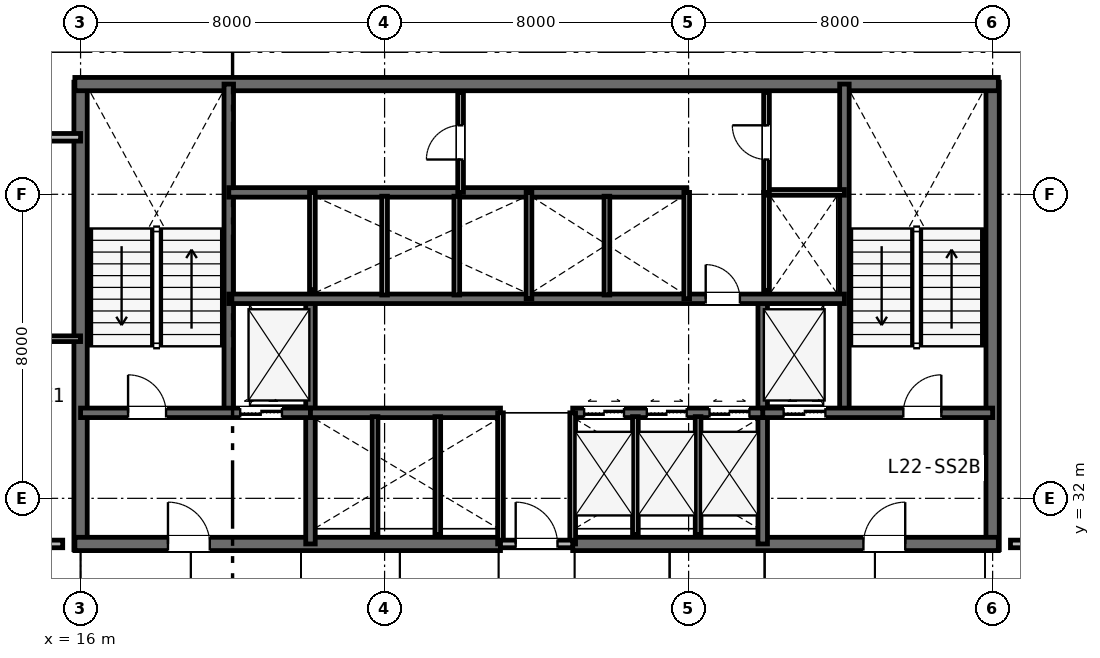
"""IFC4 building model, lengths in metres.
Left out: names, types, materials, properties, quantities, classifications, styles, units other than length and angle.
Written with IfcOpenShell. Run it as: python <this file> out.ifc"""

import sys

from ifc_helpers import new_model, si_unit, direction, frame, frame_2d, origin, place, context, subcontext, project, spatial, rectangle, extrude, element, fill, save


model = new_model("IFC4")
c1 = context("Model", 3, precision=1e-05, world=origin(), true_north=direction((0.0, 1.0)))
c2 = subcontext(c1, "Body", "Model", "MODEL_VIEW")
j1 = project(units=[si_unit("LENGTHUNIT", "METRE"), si_unit("PLANEANGLEUNIT", "RADIAN")], contexts=[c1])
p1 = place(None, origin())
s1 = spatial("IfcSite", under=j1, at=p1, CompositionType="ELEMENT")
p2 = place(p1, origin())
s2 = spatial("IfcBuilding", under=s1, at=p2, CompositionType="ELEMENT")
p3 = place(p2, frame((0.0, 0.0, 90.0)))
s3 = spatial("IfcBuildingStorey", under=s2, at=p3, CompositionType="ELEMENT", Elevation=90.0)
for number, where, z_axis, x_axis in (
    (1, (16.0, 30.65, 0.0), (0.0, 0.0, 1.0), (0.0, 1.0, 0.0)),
    (2, (40.0, 30.65, 0.0), (0.0, 0.0, 1.0), (0.0, 1.0, 0.0)),
):
    element("IfcWall", number, at=place(p3, frame(where, z_axis=z_axis, x_axis=x_axis)), inside=s3, PredefinedType="SHEAR", context=c2, shape_type="SweptSolid", body=[
        extrude(rectangle(XDim=12.3, YDim=0.35, at=frame_2d((6.15, 0.0))), origin(), (0.0, 0.0, 1.0), 3.6),
    ])
p4 = place(p3, frame((15.85, 42.9, 0.0), z_axis=(0.0, 0.0, 1.0), x_axis=(1.0, 0.0, 0.0)))
e3 = element("IfcWall", 3, at=p4, inside=s3, PredefinedType="SHEAR", context=c2, shape_type="SweptSolid", body=[
    extrude(rectangle(XDim=24.3, YDim=0.35, at=frame_2d((12.15, 0.0))), origin(), (0.0, 0.0, 1.0), 3.6),
])
p5 = place(p3, frame((15.85, 30.8, 0.0), z_axis=(0.0, 0.0, 1.0), x_axis=(1.0, 0.0, 0.0)))
e4 = element("IfcWall", 4, at=p5, inside=s3, PredefinedType="SHEAR", context=c2, shape_type="SweptSolid", body=[
    extrude(rectangle(XDim=11.2, YDim=0.35, at=frame_2d((5.6, 0.0))), origin(), (0.0, 0.0, 1.0), 3.6),
])
p6 = place(p5, frame((2.45, 0.0, 0.0)))
e5 = element("IfcOpeningElement", 5, at=p6, cuts=e4, PredefinedType="OPENING", context=c2, shape_type="SweptSolid", body=[
    extrude(rectangle(XDim=1.1, YDim=2.15, at=frame_2d((0.55, 1.075))), frame((0.0, 0.185, 0.0), z_axis=(0.0, -1.0, 0.0), x_axis=(1.0, 0.0, 0.0)), (0.0, 0.0, 1.0), 0.37),
])
p7 = place(p3, frame((28.95, 30.8, 0.0), z_axis=(0.0, 0.0, 1.0), x_axis=(1.0, 0.0, 0.0)))
e6 = element("IfcWall", 6, at=p7, inside=s3, PredefinedType="SHEAR", context=c2, shape_type="SweptSolid", body=[
    extrude(rectangle(XDim=11.2, YDim=0.35, at=frame_2d((5.6, 0.0))), origin(), (0.0, 0.0, 1.0), 3.6),
])
p8 = place(p7, frame((7.65, 0.0, 0.0)))
e7 = element("IfcOpeningElement", 7, at=p8, cuts=e6, PredefinedType="OPENING", context=c2, shape_type="SweptSolid", body=[
    extrude(rectangle(XDim=1.1, YDim=2.15, at=frame_2d((0.55, 1.075))), frame((0.0, 0.185, 0.0), z_axis=(0.0, -1.0, 0.0), x_axis=(1.0, 0.0, 0.0)), (0.0, 0.0, 1.0), 0.37),
])
for number, where, z_axis, x_axis in (
    (8, (19.9, 34.25, 0.0), (0.0, 0.0, 1.0), (0.0, 1.0, 0.0)),
    (9, (36.1, 34.25, 0.0), (0.0, 0.0, 1.0), (0.0, 1.0, 0.0)),
):
    element("IfcWall", number, at=place(p3, frame(where, z_axis=z_axis, x_axis=x_axis)), inside=s3, PredefinedType="SHEAR", context=c2, shape_type="SweptSolid", body=[
        extrude(rectangle(XDim=8.65, YDim=0.25, at=frame_2d((4.325, 0.0))), origin(), (0.0, 0.0, 1.0), 3.6),
    ])
for number, where, z_axis, x_axis in (
    (10, (22.05, 30.8, 0.0), (0.0, 0.0, 1.0), (0.0, 1.0, 0.0)),
    (11, (33.95, 30.8, 0.0), (0.0, 0.0, 1.0), (0.0, 1.0, 0.0)),
):
    element("IfcWall", number, at=place(p3, frame(where, z_axis=z_axis, x_axis=x_axis)), inside=s3, PredefinedType="SHEAR", context=c2, shape_type="SweptSolid", body=[
        extrude(rectangle(XDim=6.45, YDim=0.25, at=frame_2d((3.225, 0.0))), origin(), (0.0, 0.0, 1.0), 3.6),
    ])
p9 = place(p3, frame((16.0, 34.25, 0.0), z_axis=(0.0, 0.0, 1.0), x_axis=(1.0, 0.0, 0.0)))
e12 = element("IfcWall", 12, at=p9, inside=s3, PredefinedType="SHEAR", context=c2, shape_type="SweptSolid", body=[
    extrude(rectangle(XDim=6.05, YDim=0.25, at=frame_2d((3.025, 0.0))), origin(), (0.0, 0.0, 1.0), 3.6),
])
p10 = place(p9, frame((1.25, 0.0, 0.0)))
e13 = element("IfcOpeningElement", 13, at=p10, cuts=e12, PredefinedType="OPENING", context=c2, shape_type="SweptSolid", body=[
    extrude(rectangle(XDim=1.0, YDim=2.15, at=frame_2d((0.5, 1.075))), frame((0.0, 0.135, 0.0), z_axis=(0.0, -1.0, 0.0), x_axis=(1.0, 0.0, 0.0)), (0.0, 0.0, 1.0), 0.27),
])
p11 = place(p9, frame((4.2, 0.0, 0.0)))
e14 = element("IfcOpeningElement", 14, at=p11, cuts=e12, PredefinedType="OPENING", context=c2, shape_type="SweptSolid", body=[
    extrude(rectangle(XDim=1.1, YDim=2.15, at=frame_2d((0.55, 1.075))), frame((0.0, 0.135, 0.0), z_axis=(0.0, -1.0, 0.0), x_axis=(1.0, 0.0, 0.0)), (0.0, 0.0, 1.0), 0.27),
])
p12 = place(p3, frame((33.95, 34.25, 0.0), z_axis=(0.0, 0.0, 1.0), x_axis=(1.0, 0.0, 0.0)))
e15 = element("IfcWall", 15, at=p12, inside=s3, PredefinedType="SHEAR", context=c2, shape_type="SweptSolid", body=[
    extrude(rectangle(XDim=6.05, YDim=0.25, at=frame_2d((3.025, 0.0))), origin(), (0.0, 0.0, 1.0), 3.6),
])
p13 = place(p12, frame((3.7, 0.0, 0.0)))
e16 = element("IfcOpeningElement", 16, at=p13, cuts=e15, PredefinedType="OPENING", context=c2, shape_type="SweptSolid", body=[
    extrude(rectangle(XDim=1.0, YDim=2.15, at=frame_2d((0.5, 1.075))), frame((0.0, 0.135, 0.0), z_axis=(0.0, -1.0, 0.0), x_axis=(1.0, 0.0, 0.0)), (0.0, 0.0, 1.0), 0.27),
])
p14 = place(p12, frame((0.55, 0.0, 0.0)))
e17 = element("IfcOpeningElement", 17, at=p14, cuts=e15, PredefinedType="OPENING", context=c2, shape_type="SweptSolid", body=[
    extrude(rectangle(XDim=1.1, YDim=2.15, at=frame_2d((0.55, 1.075))), frame((0.0, 0.135, 0.0), z_axis=(0.0, -1.0, 0.0), x_axis=(1.0, 0.0, 0.0)), (0.0, 0.0, 1.0), 0.27),
])
p15 = place(p3, frame((22.05, 34.25, 0.0), z_axis=(0.0, 0.0, 1.0), x_axis=(1.0, 0.0, 0.0)))
e18 = element("IfcWall", 18, at=p15, inside=s3, PredefinedType="SHEAR", context=c2, shape_type="SweptSolid", body=[
    extrude(rectangle(XDim=5.0, YDim=0.25, at=frame_2d((2.5, 0.0))), origin(), (0.0, 0.0, 1.0), 3.6),
])
p16 = place(p3, frame((28.95, 34.25, 0.0), z_axis=(0.0, 0.0, 1.0), x_axis=(1.0, 0.0, 0.0)))
e19 = element("IfcWall", 19, at=p16, inside=s3, PredefinedType="SHEAR", context=c2, shape_type="SweptSolid", body=[
    extrude(rectangle(XDim=5.0, YDim=0.25, at=frame_2d((2.5, 0.0))), origin(), (0.0, 0.0, 1.0), 3.6),
])
p17 = place(p16, frame((0.3, 0.0, 0.0)))
e20 = element("IfcOpeningElement", 20, at=p17, cuts=e19, PredefinedType="OPENING", context=c2, shape_type="SweptSolid", body=[
    extrude(rectangle(XDim=1.05, YDim=2.15, at=frame_2d((0.525, 1.075))), frame((0.0, 0.135, 0.0), z_axis=(0.0, -1.0, 0.0), x_axis=(1.0, 0.0, 0.0)), (0.0, 0.0, 1.0), 0.27),
])
p18 = place(p16, frame((1.95, 0.0, 0.0)))
e21 = element("IfcOpeningElement", 21, at=p18, cuts=e19, PredefinedType="OPENING", context=c2, shape_type="SweptSolid", body=[
    extrude(rectangle(XDim=1.05, YDim=2.15, at=frame_2d((0.525, 1.075))), frame((0.0, 0.135, 0.0), z_axis=(0.0, -1.0, 0.0), x_axis=(1.0, 0.0, 0.0)), (0.0, 0.0, 1.0), 0.27),
])
p19 = place(p16, frame((3.6, 0.0, 0.0)))
e22 = element("IfcOpeningElement", 22, at=p19, cuts=e19, PredefinedType="OPENING", context=c2, shape_type="SweptSolid", body=[
    extrude(rectangle(XDim=1.05, YDim=2.15, at=frame_2d((0.525, 1.075))), frame((0.0, 0.135, 0.0), z_axis=(0.0, -1.0, 0.0), x_axis=(1.0, 0.0, 0.0)), (0.0, 0.0, 1.0), 0.27),
])
p20 = place(p3, frame((19.9, 37.25, 0.0), z_axis=(0.0, 0.0, 1.0), x_axis=(1.0, 0.0, 0.0)))
e23 = element("IfcWall", 23, at=p20, inside=s3, PredefinedType="SHEAR", context=c2, shape_type="SweptSolid", body=[
    extrude(rectangle(XDim=16.2, YDim=0.25, at=frame_2d((8.1, 0.0))), origin(), (0.0, 0.0, 1.0), 3.6),
])
p21 = place(p20, frame((12.55, 0.0, 0.0)))
e24 = element("IfcOpeningElement", 24, at=p21, cuts=e23, PredefinedType="OPENING", context=c2, shape_type="SweptSolid", body=[
    extrude(rectangle(XDim=0.9, YDim=2.15, at=frame_2d((0.45, 1.075))), frame((0.0, 0.135, 0.0), z_axis=(0.0, -1.0, 0.0), x_axis=(1.0, 0.0, 0.0)), (0.0, 0.0, 1.0), 0.27),
])
p22 = place(p3, frame((19.9, 40.05, 0.0), z_axis=(0.0, 0.0, 1.0), x_axis=(1.0, 0.0, 0.0)))
e25 = element("IfcWall", 25, at=p22, inside=s3, PredefinedType="SHEAR", context=c2, shape_type="SweptSolid", body=[
    extrude(rectangle(XDim=12.05, YDim=0.25, at=frame_2d((6.025, 0.0))), origin(), (0.0, 0.0, 1.0), 3.6),
])
p23 = place(p3, frame((27.05, 30.8, 0.0), z_axis=(0.0, 0.0, 1.0), x_axis=(0.0, 1.0, 0.0)))
e26 = element("IfcWall", 26, at=p23, inside=s3, PredefinedType="PLUMBINGWALL", context=c2, shape_type="SweptSolid", body=[
    extrude(rectangle(XDim=3.45, YDim=0.15, at=frame_2d((1.725, 0.0))), origin(), (0.0, 0.0, 1.0), 3.02),
])
p24 = place(p3, frame((28.95, 30.8, 0.0), z_axis=(0.0, 0.0, 1.0), x_axis=(0.0, 1.0, 0.0)))
e27 = element("IfcWall", 27, at=p24, inside=s3, PredefinedType="PLUMBINGWALL", context=c2, shape_type="SweptSolid", body=[
    extrude(rectangle(XDim=3.45, YDim=0.15, at=frame_2d((1.725, 0.0))), origin(), (0.0, 0.0, 1.0), 3.33),
])
p25 = place(p3, frame((27.05, 30.8, 0.0), z_axis=(0.0, 0.0, 1.0), x_axis=(1.0, 0.0, 0.0)))
e28 = element("IfcWall", 28, at=p25, inside=s3, PredefinedType="PARTITIONING", context=c2, shape_type="SweptSolid", body=[
    extrude(rectangle(XDim=1.9, YDim=0.2, at=frame_2d((0.95, 0.0))), origin(), (0.0, 0.0, 1.0), 3.02),
])
p26 = place(p25, frame((0.4, 0.0, 0.0)))
e29 = element("IfcOpeningElement", 29, at=p26, cuts=e28, PredefinedType="OPENING", context=c2, shape_type="SweptSolid", body=[
    extrude(rectangle(XDim=1.1, YDim=2.15, at=frame_2d((0.55, 1.075))), frame((0.0, 0.11, 0.0), z_axis=(0.0, -1.0, 0.0), x_axis=(1.0, 0.0, 0.0)), (0.0, 0.0, 1.0), 0.22),
])
p27 = place(p3, frame((23.75, 31.05, 0.0), z_axis=(0.0, 0.0, 1.0), x_axis=(0.0, 1.0, 0.0)))
e30 = element("IfcWall", 30, at=p27, inside=s3, PredefinedType="PLUMBINGWALL", context=c2, shape_type="SweptSolid", body=[
    extrude(rectangle(XDim=3.1, YDim=0.15, at=frame_2d((1.55, 0.0))), origin(), (0.0, 0.0, 1.0), 2.83),
])
for number, where, z_axis, x_axis in (
    (31, (25.4, 31.05, 0.0), (0.0, 0.0, 1.0), (0.0, 1.0, 0.0)),
    (32, (30.6, 31.05, 0.0), (0.0, 0.0, 1.0), (0.0, 1.0, 0.0)),
    (33, (32.25, 31.05, 0.0), (0.0, 0.0, 1.0), (0.0, 1.0, 0.0)),
):
    element("IfcWall", number, at=place(p3, frame(where, z_axis=z_axis, x_axis=x_axis)), inside=s3, PredefinedType="PLUMBINGWALL", context=c2, shape_type="SweptSolid", body=[
        extrude(rectangle(XDim=3.1, YDim=0.15, at=frame_2d((1.55, 0.0))), origin(), (0.0, 0.0, 1.0), 3.33),
    ])
p28 = place(p3, frame((22.1, 37.49, 0.0), z_axis=(0.0, 0.0, 1.0), x_axis=(0.0, 1.0, 0.0)))
e34 = element("IfcWall", 34, at=p28, inside=s3, PredefinedType="PLUMBINGWALL", context=c2, shape_type="SweptSolid", body=[
    extrude(rectangle(XDim=2.56, YDim=0.15, at=frame_2d((1.28, 0.0))), origin(), (0.0, 0.0, 1.0), 3.33),
])
p29 = place(p3, frame((27.8, 37.25, 0.0), z_axis=(0.0, 0.0, 1.0), x_axis=(0.0, 1.0, 0.0)))
e35 = element("IfcWall", 35, at=p29, inside=s3, PredefinedType="PLUMBINGWALL", context=c2, shape_type="SweptSolid", body=[
    extrude(rectangle(XDim=2.8, YDim=0.15, at=frame_2d((1.4, 0.0))), origin(), (0.0, 0.0, 1.0), 3.33),
])
for number, where, z_axis, x_axis in (
    (36, (24.0, 37.35, 0.0), (0.0, 0.0, 1.0), (0.0, 1.0, 0.0)),
    (37, (25.9, 37.35, 0.0), (0.0, 0.0, 1.0), (0.0, 1.0, 0.0)),
):
    element("IfcWall", number, at=place(p3, frame(where, z_axis=z_axis, x_axis=x_axis)), inside=s3, PredefinedType="PLUMBINGWALL", context=c2, shape_type="SweptSolid", body=[
        extrude(rectangle(XDim=2.6, YDim=0.15, at=frame_2d((1.3, 0.0))), origin(), (0.0, 0.0, 1.0), 3.33),
    ])
p30 = place(p3, frame((31.95, 37.25, 0.0), z_axis=(0.0, 0.0, 1.0), x_axis=(0.0, 1.0, 0.0)))
e38 = element("IfcWall", 38, at=p30, inside=s3, PredefinedType="PLUMBINGWALL", context=c2, shape_type="SweptSolid", body=[
    extrude(rectangle(XDim=2.8, YDim=0.15, at=frame_2d((1.4, 0.0))), origin(), (0.0, 0.0, 1.0), 3.33),
])
p31 = place(p3, frame((29.85, 37.35, 0.0), z_axis=(0.0, 0.0, 1.0), x_axis=(0.0, 1.0, 0.0)))
e39 = element("IfcWall", 39, at=p31, inside=s3, PredefinedType="PLUMBINGWALL", context=c2, shape_type="SweptSolid", body=[
    extrude(rectangle(XDim=2.6, YDim=0.15, at=frame_2d((1.3, 0.0))), origin(), (0.0, 0.0, 1.0), 3.33),
])
p32 = place(p3, frame((34.05, 37.473, 0.0), z_axis=(0.0, 0.0, 1.0), x_axis=(0.0, 1.0, 0.0)))
e40 = element("IfcWall", 40, at=p32, inside=s3, PredefinedType="PLUMBINGWALL", context=c2, shape_type="SweptSolid", body=[
    extrude(rectangle(XDim=2.577, YDim=0.15, at=frame_2d((1.288, 0.0))), origin(), (0.0, 0.0, 1.0), 3.33),
])
p33 = place(p3, frame((34.05, 40.05, 0.0), z_axis=(0.0, 0.0, 1.0), x_axis=(1.0, 0.0, 0.0)))
e41 = element("IfcWall", 41, at=p33, inside=s3, PredefinedType="PARTITIONING", context=c2, shape_type="SweptSolid", body=[
    extrude(rectangle(XDim=2.05, YDim=0.15, at=frame_2d((1.025, 0.0))), origin(), (0.0, 0.0, 1.0), 3.33),
])
p34 = place(p3, frame((34.05, 40.05, 0.0), z_axis=(0.0, 0.0, 1.0), x_axis=(0.0, 1.0, 0.0)))
e42 = element("IfcWall", 42, at=p34, inside=s3, PredefinedType="PARTITIONING", context=c2, shape_type="SweptSolid", body=[
    extrude(rectangle(XDim=2.63, YDim=0.15, at=frame_2d((1.315, 0.0))), origin(), (0.0, 0.0, 1.0), 3.33),
])
p35 = place(p34, frame((0.865, 0.0, 0.0)))
e43 = element("IfcOpeningElement", 43, at=p35, cuts=e42, PredefinedType="OPENING", context=c2, shape_type="SweptSolid", body=[
    extrude(rectangle(XDim=0.9, YDim=2.15, at=frame_2d((0.45, 1.075))), frame((0.0, 0.085, 0.0), z_axis=(0.0, -1.0, 0.0), x_axis=(1.0, 0.0, 0.0)), (0.0, 0.0, 1.0), 0.17),
])
p36 = place(p3, frame((26.0, 40.05, 0.0), z_axis=(0.0, 0.0, 1.0), x_axis=(0.0, 1.0, 0.0)))
e44 = element("IfcWall", 44, at=p36, inside=s3, PredefinedType="PARTITIONING", context=c2, shape_type="SweptSolid", body=[
    extrude(rectangle(XDim=2.63, YDim=0.15, at=frame_2d((1.315, 0.0))), origin(), (0.0, 0.0, 1.0), 3.33),
])
p37 = place(p36, frame((0.865, 0.0, 0.0)))
e45 = element("IfcOpeningElement", 45, at=p37, cuts=e44, PredefinedType="OPENING", context=c2, shape_type="SweptSolid", body=[
    extrude(rectangle(XDim=0.9, YDim=2.15, at=frame_2d((0.45, 1.075))), frame((0.0, 0.085, 0.0), z_axis=(0.0, -1.0, 0.0), x_axis=(1.0, 0.0, 0.0)), (0.0, 0.0, 1.0), 0.17),
])
p38 = place(p3, frame((11.4, 30.8, 0.0), z_axis=(0.0, 0.0, 1.0), x_axis=(1.0, 0.0, 0.0)))
e46 = element("IfcWall", 46, at=p38, inside=s3, PredefinedType="PARTITIONING", context=c2, shape_type="SweptSolid", body=[
    extrude(rectangle(XDim=4.13, YDim=0.2, at=frame_2d((2.065, 0.0))), origin(), (0.0, 0.0, 1.0), 2.83),
])
p39 = place(p3, frame((40.47, 30.8, 0.0), z_axis=(0.0, 0.0, 1.0), x_axis=(1.0, 0.0, 0.0)))
e47 = element("IfcWall", 47, at=p39, inside=s3, PredefinedType="PARTITIONING", context=c2, shape_type="SweptSolid", body=[
    extrude(rectangle(XDim=1.73, YDim=0.2, at=frame_2d((0.865, 0.0))), origin(), (0.0, 0.0, 1.0), 2.83),
])
p40 = place(p3, frame((0.1, 41.5, 0.0), z_axis=(0.0, 0.0, 1.0), x_axis=(1.0, 0.0, 0.0)))
e48 = element("IfcWall", 48, at=p40, inside=s3, PredefinedType="PARTITIONING", context=c2, shape_type="SweptSolid", body=[
    extrude(rectangle(XDim=15.9, YDim=0.2, at=frame_2d((7.95, 0.0))), origin(), (0.0, 0.0, 1.0), 2.83),
])
p41 = place(p40, frame((9.877, 0.0, 0.0)))
e49 = element("IfcOpeningElement", 49, at=p41, cuts=e48, PredefinedType="OPENING", context=c2, shape_type="SweptSolid", body=[
    extrude(rectangle(XDim=0.95, YDim=2.15, at=frame_2d((0.475, 1.075))), frame((0.0, 0.11, 0.0), z_axis=(0.0, -1.0, 0.0), x_axis=(1.0, 0.0, 0.0)), (0.0, 0.0, 1.0), 0.22),
])
p42 = place(p3, frame((11.4, 36.2, 0.0), z_axis=(0.0, 0.0, 1.0), x_axis=(1.0, 0.0, 0.0)))
e50 = element("IfcWall", 50, at=p42, inside=s3, PredefinedType="PARTITIONING", context=c2, shape_type="SweptSolid", body=[
    extrude(rectangle(XDim=4.6, YDim=0.15, at=frame_2d((2.3, 0.0))), origin(), (0.0, 0.0, 1.0), 3.33),
])
p43 = place(p26, origin())
e51 = element("IfcDoor", 51, at=p43, inside=s3, OperationType="SINGLE_SWING_LEFT", PredefinedType="DOOR", context=c2, shape_type="SweptSolid", body=[
    extrude(rectangle(XDim=1.1, YDim=2.15, at=frame_2d((0.55, 1.075))), frame((0.0, 0.025, 0.0), z_axis=(0.0, -1.0, 0.0), x_axis=(1.0, 0.0, 0.0)), (0.0, 0.0, 1.0), 0.05),
])
fill(e29, e51)
p44 = place(p10, origin())
e52 = element("IfcDoor", 52, at=p44, inside=s3, OperationType="SINGLE_SWING_LEFT", PredefinedType="DOOR", context=c2, shape_type="SweptSolid", body=[
    extrude(rectangle(XDim=1.0, YDim=2.15, at=frame_2d((0.5, 1.075))), frame((0.0, 0.025, 0.0), z_axis=(0.0, -1.0, 0.0), x_axis=(1.0, 0.0, 0.0)), (0.0, 0.0, 1.0), 0.05),
])
fill(e13, e52)
p45 = place(p13, origin())
e53 = element("IfcDoor", 53, at=p45, inside=s3, OperationType="SINGLE_SWING_RIGHT", PredefinedType="DOOR", context=c2, shape_type="SweptSolid", body=[
    extrude(rectangle(XDim=1.0, YDim=2.15, at=frame_2d((0.5, 1.075))), frame((0.0, 0.025, 0.0), z_axis=(0.0, -1.0, 0.0), x_axis=(1.0, 0.0, 0.0)), (0.0, 0.0, 1.0), 0.05),
])
fill(e16, e53)
p46 = place(p6, origin())
e54 = element("IfcDoor", 54, at=p46, inside=s3, OperationType="SINGLE_SWING_LEFT", PredefinedType="DOOR", context=c2, shape_type="SweptSolid", body=[
    extrude(rectangle(XDim=1.1, YDim=2.15, at=frame_2d((0.55, 1.075))), frame((0.0, 0.025, 0.0), z_axis=(0.0, -1.0, 0.0), x_axis=(1.0, 0.0, 0.0)), (0.0, 0.0, 1.0), 0.05),
])
fill(e5, e54)
p47 = place(p8, origin())
e55 = element("IfcDoor", 55, at=p47, inside=s3, OperationType="SINGLE_SWING_RIGHT", PredefinedType="DOOR", context=c2, shape_type="SweptSolid", body=[
    extrude(rectangle(XDim=1.1, YDim=2.15, at=frame_2d((0.55, 1.075))), frame((0.0, 0.025, 0.0), z_axis=(0.0, -1.0, 0.0), x_axis=(1.0, 0.0, 0.0)), (0.0, 0.0, 1.0), 0.05),
])
fill(e7, e55)
p48 = place(p21, origin())
e56 = element("IfcDoor", 56, at=p48, inside=s3, OperationType="SINGLE_SWING_LEFT", PredefinedType="DOOR", context=c2, shape_type="SweptSolid", body=[
    extrude(rectangle(XDim=0.9, YDim=2.15, at=frame_2d((0.45, 1.075))), frame((0.0, 0.025, 0.0), z_axis=(0.0, -1.0, 0.0), x_axis=(1.0, 0.0, 0.0)), (0.0, 0.0, 1.0), 0.05),
])
fill(e24, e56)
p49 = place(p35, origin())
e57 = element("IfcDoor", 57, at=p49, inside=s3, OperationType="SINGLE_SWING_RIGHT", PredefinedType="DOOR", context=c2, shape_type="SweptSolid", body=[
    extrude(rectangle(XDim=0.9, YDim=2.15, at=frame_2d((0.45, 1.075))), frame((0.0, 0.025, 0.0), z_axis=(0.0, -1.0, 0.0), x_axis=(1.0, 0.0, 0.0)), (0.0, 0.0, 1.0), 0.05),
])
fill(e43, e57)
p50 = place(p37, origin())
e58 = element("IfcDoor", 58, at=p50, inside=s3, OperationType="SINGLE_SWING_LEFT", PredefinedType="DOOR", context=c2, shape_type="SweptSolid", body=[
    extrude(rectangle(XDim=0.9, YDim=2.15, at=frame_2d((0.45, 1.075))), frame((0.0, 0.025, 0.0), z_axis=(0.0, -1.0, 0.0), x_axis=(1.0, 0.0, 0.0)), (0.0, 0.0, 1.0), 0.05),
])
fill(e45, e58)
p51 = place(p11, origin())
e59 = element("IfcDoor", 59, at=p51, inside=s3, OperationType="DOUBLE_DOOR_SLIDING", PredefinedType="DOOR", context=c2, shape_type="SweptSolid", body=[
    extrude(rectangle(XDim=1.1, YDim=2.15, at=frame_2d((0.55, 1.075))), frame((0.0, 0.025, 0.0), z_axis=(0.0, -1.0, 0.0), x_axis=(1.0, 0.0, 0.0)), (0.0, 0.0, 1.0), 0.05),
])
fill(e14, e59)
p52 = place(p14, origin())
e60 = element("IfcDoor", 60, at=p52, inside=s3, OperationType="DOUBLE_DOOR_SLIDING", PredefinedType="DOOR", context=c2, shape_type="SweptSolid", body=[
    extrude(rectangle(XDim=1.1, YDim=2.15, at=frame_2d((0.55, 1.075))), frame((0.0, 0.025, 0.0), z_axis=(0.0, -1.0, 0.0), x_axis=(1.0, 0.0, 0.0)), (0.0, 0.0, 1.0), 0.05),
])
fill(e17, e60)
p53 = place(p17, origin())
e61 = element("IfcDoor", 61, at=p53, inside=s3, OperationType="DOUBLE_DOOR_SLIDING", PredefinedType="DOOR", context=c2, shape_type="SweptSolid", body=[
    extrude(rectangle(XDim=1.05, YDim=2.15, at=frame_2d((0.525, 1.075))), frame((0.0, 0.025, 0.0), z_axis=(0.0, -1.0, 0.0), x_axis=(1.0, 0.0, 0.0)), (0.0, 0.0, 1.0), 0.05),
])
fill(e20, e61)
p54 = place(p18, origin())
e62 = element("IfcDoor", 62, at=p54, inside=s3, OperationType="DOUBLE_DOOR_SLIDING", PredefinedType="DOOR", context=c2, shape_type="SweptSolid", body=[
    extrude(rectangle(XDim=1.05, YDim=2.15, at=frame_2d((0.525, 1.075))), frame((0.0, 0.025, 0.0), z_axis=(0.0, -1.0, 0.0), x_axis=(1.0, 0.0, 0.0)), (0.0, 0.0, 1.0), 0.05),
])
fill(e21, e62)
p55 = place(p19, origin())
e63 = element("IfcDoor", 63, at=p55, inside=s3, OperationType="DOUBLE_DOOR_SLIDING", PredefinedType="DOOR", context=c2, shape_type="SweptSolid", body=[
    extrude(rectangle(XDim=1.05, YDim=2.15, at=frame_2d((0.525, 1.075))), frame((0.0, 0.025, 0.0), z_axis=(0.0, -1.0, 0.0), x_axis=(1.0, 0.0, 0.0)), (0.0, 0.0, 1.0), 0.05),
])
fill(e22, e63)
save(model, sys.argv[1])
